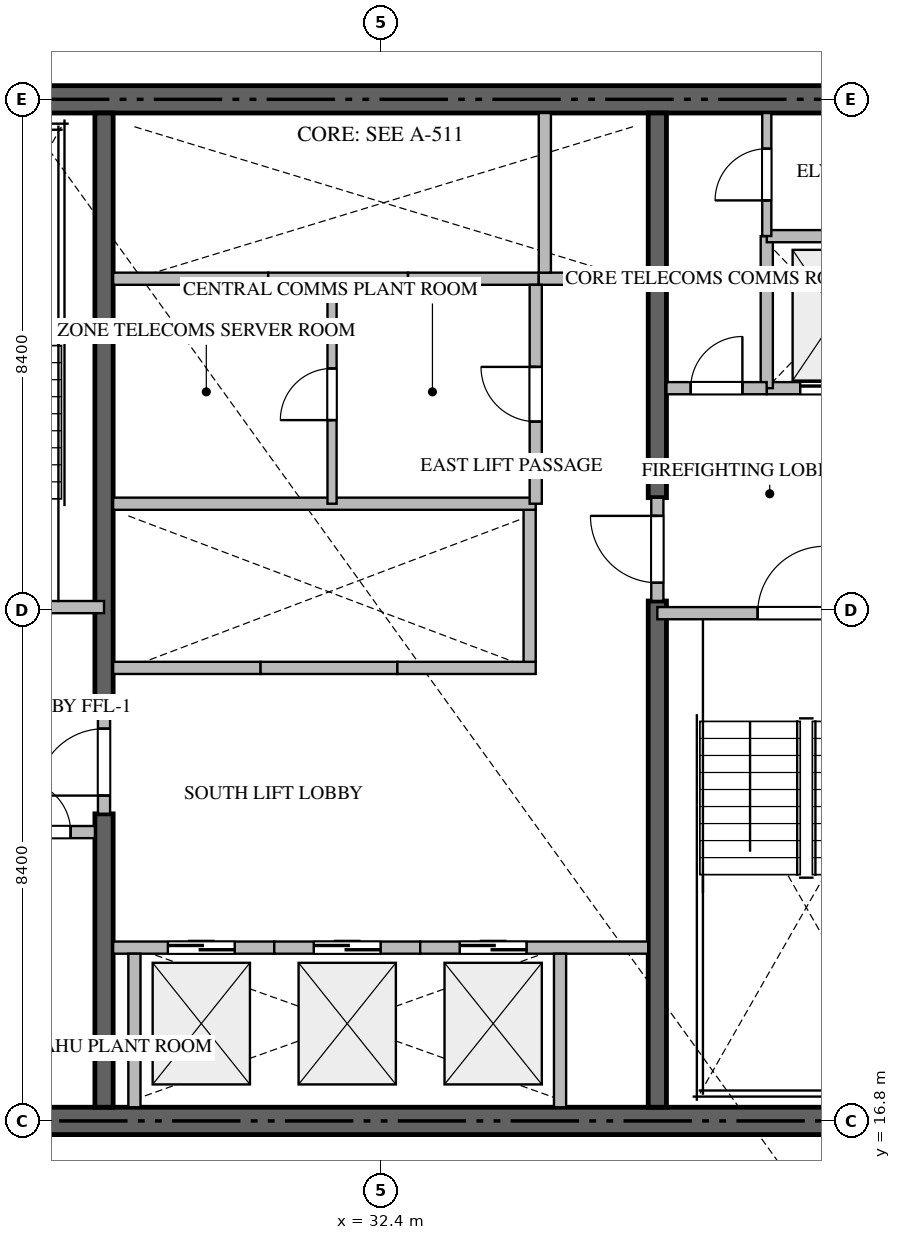
"""IFC4 building model, lengths in metres.
Left out: names, types, materials, properties, quantities, classifications, styles, units other than length and angle.
Written with IfcOpenShell. Run it as: python <this file> out.ifc"""

import sys

from ifc_helpers import new_model, si_unit, direction, frame, frame_2d, origin, place, context, subcontext, project, spatial, rectangle, extrude, source, transform, mapped, element, fill, save


model = new_model("IFC4")
c1 = context("Model", 3, precision=1e-05, world=origin(), true_north=direction((0.0, 1.0)))
c2 = subcontext(c1, "Body", "Model", "MODEL_VIEW")
j1 = project(units=[si_unit("LENGTHUNIT", "METRE"), si_unit("PLANEANGLEUNIT", "RADIAN")], contexts=[c1])
p1 = place(None, origin())
s1 = spatial("IfcSite", under=j1, at=p1, CompositionType="ELEMENT")
p2 = place(p1, origin())
s2 = spatial("IfcBuilding", under=s1, at=p2, CompositionType="ELEMENT")
p3 = place(p2, frame((0.0, 0.0, 34.2)))
s3 = spatial("IfcBuildingStorey", under=s2, at=p3, CompositionType="ELEMENT", Elevation=34.2)
for number, where, z_axis, x_axis in (
    (1, (23.4, 16.8, -0.26), (0.0, 0.0, 1.0), (1.0, 0.0, 0.0)),
    (2, (41.4, 33.6, -0.26), (0.0, 0.0, 1.0), (-1.0, 0.0, 0.0)),
):
    element("IfcWall", number, at=place(p3, frame(where, z_axis=z_axis, x_axis=x_axis)), inside=s3, PredefinedType="SHEAR", context=c2, shape_type="SweptSolid", body=[
        extrude(rectangle(XDim=18.0, YDim=0.45, at=frame_2d((9.0, 0.0))), origin(), (0.0, 0.0, 1.0), 3.748),
    ])
p4 = place(p3, frame((27.85, 17.025, -0.26), z_axis=(0.0, 0.0, 1.0), x_axis=(0.0, 1.0, 0.0)))
e3 = element("IfcWall", 3, at=p4, inside=s3, PredefinedType="SHEAR", context=c2, shape_type="SweptSolid", body=[
    extrude(rectangle(XDim=4.825, YDim=0.3, at=frame_2d((2.413, 0.0))), origin(), (0.0, 0.0, 1.0), 3.748),
])
p5 = place(p3, frame((27.85, 23.55, -0.26), z_axis=(0.0, 0.0, 1.0), x_axis=(0.0, 1.0, 0.0)))
e4 = element("IfcWall", 4, at=p5, inside=s3, PredefinedType="SHEAR", context=c2, shape_type="SweptSolid", body=[
    extrude(rectangle(XDim=9.825, YDim=0.3, at=frame_2d((4.913, 0.0))), origin(), (0.0, 0.0, 1.0), 3.748),
])
p6 = place(p3, frame((36.95, 17.025, -0.26), z_axis=(0.0, 0.0, 1.0), x_axis=(0.0, 1.0, 0.0)))
e5 = element("IfcWall", 5, at=p6, inside=s3, PredefinedType="SHEAR", context=c2, shape_type="SweptSolid", body=[
    extrude(rectangle(XDim=8.325, YDim=0.3, at=frame_2d((4.163, 0.0))), origin(), (0.0, 0.0, 1.0), 3.748),
])
p7 = place(p3, frame((36.95, 27.05, -0.26), z_axis=(0.0, 0.0, 1.0), x_axis=(0.0, 1.0, 0.0)))
e6 = element("IfcWall", 6, at=p7, inside=s3, PredefinedType="SHEAR", context=c2, shape_type="SweptSolid", body=[
    extrude(rectangle(XDim=6.325, YDim=0.3, at=frame_2d((3.163, 0.0))), origin(), (0.0, 0.0, 1.0), 3.748),
])
p8 = place(p3, frame((23.4, 25.25, 0.0), z_axis=(0.0, 0.0, 1.0), x_axis=(1.0, 0.0, 0.0)))
e7 = element("IfcWall", 7, at=p8, inside=s3, PredefinedType="STANDARD", context=c2, shape_type="SweptSolid", body=[
    extrude(rectangle(XDim=4.45, YDim=0.2, at=frame_2d((2.225, 0.0))), origin(), (0.0, 0.0, 1.0), 3.49),
])
p9 = place(p8, frame((1.65, 0.0, 0.0)))
e8 = element("IfcOpeningElement", 8, at=p9, cuts=e7, PredefinedType="OPENING", context=c2, shape_type="SweptSolid", body=[
    extrude(rectangle(XDim=1.1, YDim=2.15, at=frame_2d((0.55, 1.075))), frame((0.0, 0.11, 0.0), z_axis=(0.0, -1.0, 0.0), x_axis=(1.0, 0.0, 0.0)), (0.0, 0.0, 1.0), 0.22),
])
p10 = place(p3, frame((36.95, 25.15, 0.0), z_axis=(0.0, 0.0, 1.0), x_axis=(1.0, 0.0, 0.0)))
e9 = element("IfcWall", 9, at=p10, inside=s3, PredefinedType="STANDARD", context=c2, shape_type="SweptSolid", body=[
    extrude(rectangle(XDim=4.45, YDim=0.2, at=frame_2d((2.225, 0.0))), origin(), (0.0, 0.0, 1.0), 3.49),
])
p11 = place(p10, frame((1.65, 0.0, 0.0)))
e10 = element("IfcOpeningElement", 10, at=p11, cuts=e9, PredefinedType="OPENING", context=c2, shape_type="SweptSolid", body=[
    extrude(rectangle(XDim=1.1, YDim=2.15, at=frame_2d((0.55, 1.075))), frame((0.0, 0.11, 0.0), z_axis=(0.0, -1.0, 0.0), x_axis=(1.0, 0.0, 0.0)), (0.0, 0.0, 1.0), 0.22),
])
p12 = place(p3, frame((38.75, 28.85, 0.0), z_axis=(0.0, 0.0, 1.0), x_axis=(1.0, 0.0, 0.0)))
e11 = element("IfcWall", 11, at=p12, inside=s3, PredefinedType="STANDARD", context=c2, shape_type="SweptSolid", body=[
    extrude(rectangle(XDim=2.425, YDim=0.2, at=frame_2d((1.212, 0.0))), origin(), (0.0, 0.0, 1.0), 3.49),
])
p13 = place(p12, frame((0.55, 0.0, 0.0)))
e12 = element("IfcOpeningElement", 12, at=p13, cuts=e11, PredefinedType="OPENING", context=c2, shape_type="SweptSolid", body=[
    extrude(rectangle(XDim=1.2, YDim=2.2, at=frame_2d((0.6, 1.1))), frame((0.0, 0.11, 0.0), z_axis=(0.0, -1.0, 0.0), x_axis=(1.0, 0.0, 0.0)), (0.0, 0.0, 1.0), 0.22),
])
p14 = place(p3, frame((28.0, 19.65, 0.0), z_axis=(0.0, 0.0, 1.0), x_axis=(1.0, 0.0, 0.0)))
e13 = element("IfcWall", 13, at=p14, inside=s3, PredefinedType="STANDARD", context=c2, shape_type="SweptSolid", body=[
    extrude(rectangle(XDim=2.65, YDim=0.2, at=frame_2d((1.325, 0.0))), origin(), (0.0, 0.0, 1.0), 3.49),
])
p15 = place(p14, frame((0.9, 0.0, 0.0)))
e14 = element("IfcOpeningElement", 14, at=p15, cuts=e13, PredefinedType="OPENING", context=c2, shape_type="SweptSolid", body=[
    extrude(rectangle(XDim=1.1, YDim=2.2, at=frame_2d((0.55, 1.1))), frame((0.0, 0.11, 0.0), z_axis=(0.0, -1.0, 0.0), x_axis=(1.0, 0.0, 0.0)), (0.0, 0.0, 1.0), 0.22),
])
p16 = place(p3, frame((28.35, 17.025, 0.0), z_axis=(0.0, 0.0, 1.0), x_axis=(0.0, 1.0, 0.0)))
e15 = element("IfcWall", 15, at=p16, inside=s3, PredefinedType="STANDARD", context=c2, shape_type="SweptSolid", body=[
    extrude(rectangle(XDim=2.525, YDim=0.2, at=frame_2d((1.263, 0.0))), origin(), (0.0, 0.0, 1.0), 3.49),
])
p17 = place(p3, frame((30.65, 19.65, 0.0), z_axis=(0.0, 0.0, 1.0), x_axis=(1.0, 0.0, 0.0)))
e16 = element("IfcWall", 16, at=p17, inside=s3, PredefinedType="STANDARD", context=c2, shape_type="SweptSolid", body=[
    extrude(rectangle(XDim=2.4, YDim=0.2, at=frame_2d((1.2, 0.0))), origin(), (0.0, 0.0, 1.0), 3.49),
])
p18 = place(p17, frame((0.65, 0.0, 0.0)))
e17 = element("IfcOpeningElement", 17, at=p18, cuts=e16, PredefinedType="OPENING", context=c2, shape_type="SweptSolid", body=[
    extrude(rectangle(XDim=1.1, YDim=2.2, at=frame_2d((0.55, 1.1))), frame((0.0, 0.11, 0.0), z_axis=(0.0, -1.0, 0.0), x_axis=(1.0, 0.0, 0.0)), (0.0, 0.0, 1.0), 0.22),
])
p19 = place(p3, frame((33.05, 19.65, 0.0), z_axis=(0.0, 0.0, 1.0), x_axis=(1.0, 0.0, 0.0)))
e18 = element("IfcWall", 18, at=p19, inside=s3, PredefinedType="STANDARD", context=c2, shape_type="SweptSolid", body=[
    extrude(rectangle(XDim=3.75, YDim=0.2, at=frame_2d((1.875, 0.0))), origin(), (0.0, 0.0, 1.0), 3.49),
])
p20 = place(p19, frame((0.65, 0.0, 0.0)))
e19 = element("IfcOpeningElement", 19, at=p20, cuts=e18, PredefinedType="OPENING", context=c2, shape_type="SweptSolid", body=[
    extrude(rectangle(XDim=1.1, YDim=2.2, at=frame_2d((0.55, 1.1))), frame((0.0, 0.11, 0.0), z_axis=(0.0, -1.0, 0.0), x_axis=(1.0, 0.0, 0.0)), (0.0, 0.0, 1.0), 0.22),
])
p21 = place(p3, frame((35.35, 17.025, 0.0), z_axis=(0.0, 0.0, 1.0), x_axis=(0.0, 1.0, 0.0)))
e20 = element("IfcWall", 20, at=p21, inside=s3, PredefinedType="STANDARD", context=c2, shape_type="SweptSolid", body=[
    extrude(rectangle(XDim=2.525, YDim=0.2, at=frame_2d((1.263, 0.0))), origin(), (0.0, 0.0, 1.0), 3.49),
])
p22 = place(p3, frame((28.0, 24.25, 0.0), z_axis=(0.0, 0.0, 1.0), x_axis=(1.0, 0.0, 0.0)))
e21 = element("IfcWall", 21, at=p22, inside=s3, PredefinedType="STANDARD", context=c2, shape_type="SweptSolid", body=[
    extrude(rectangle(XDim=2.425, YDim=0.2, at=frame_2d((1.212, 0.0))), origin(), (0.0, 0.0, 1.0), 3.49),
])
p23 = place(p3, frame((30.425, 24.25, 0.0), z_axis=(0.0, 0.0, 1.0), x_axis=(1.0, 0.0, 0.0)))
e22 = element("IfcWall", 22, at=p23, inside=s3, PredefinedType="STANDARD", context=c2, shape_type="SweptSolid", body=[
    extrude(rectangle(XDim=2.25, YDim=0.2, at=frame_2d((1.125, 0.0))), origin(), (0.0, 0.0, 1.0), 3.49),
])
p24 = place(p3, frame((32.675, 24.25, 0.0), z_axis=(0.0, 0.0, 1.0), x_axis=(1.0, 0.0, 0.0)))
e23 = element("IfcWall", 23, at=p24, inside=s3, PredefinedType="STANDARD", context=c2, shape_type="SweptSolid", body=[
    extrude(rectangle(XDim=2.275, YDim=0.2, at=frame_2d((1.137, 0.0))), origin(), (0.0, 0.0, 1.0), 3.49),
])
p25 = place(p3, frame((34.85, 24.35, 0.0), z_axis=(0.0, 0.0, 1.0), x_axis=(0.0, 1.0, 0.0)))
e24 = element("IfcWall", 24, at=p25, inside=s3, PredefinedType="STANDARD", context=c2, shape_type="SweptSolid", body=[
    extrude(rectangle(XDim=2.5, YDim=0.2, at=frame_2d((1.25, 0.0))), origin(), (0.0, 0.0, 1.0), 3.49),
])
p26 = place(p3, frame((28.0, 30.65, 0.0), z_axis=(0.0, 0.0, 1.0), x_axis=(1.0, 0.0, 0.0)))
e25 = element("IfcWall", 25, at=p26, inside=s3, PredefinedType="STANDARD", context=c2, shape_type="SweptSolid", body=[
    extrude(rectangle(XDim=2.55, YDim=0.2, at=frame_2d((1.275, 0.0))), origin(), (0.0, 0.0, 1.0), 3.49),
])
p27 = place(p3, frame((30.55, 30.65, 0.0), z_axis=(0.0, 0.0, 1.0), x_axis=(1.0, 0.0, 0.0)))
e26 = element("IfcWall", 26, at=p27, inside=s3, PredefinedType="STANDARD", context=c2, shape_type="SweptSolid", body=[
    extrude(rectangle(XDim=2.3, YDim=0.2, at=frame_2d((1.15, 0.0))), origin(), (0.0, 0.0, 1.0), 3.49),
])
p28 = place(p3, frame((32.85, 30.65, 0.0), z_axis=(0.0, 0.0, 1.0), x_axis=(1.0, 0.0, 0.0)))
e27 = element("IfcWall", 27, at=p28, inside=s3, PredefinedType="STANDARD", context=c2, shape_type="SweptSolid", body=[
    extrude(rectangle(XDim=2.15, YDim=0.2, at=frame_2d((1.075, 0.0))), origin(), (0.0, 0.0, 1.0), 3.49),
])
p29 = place(p3, frame((35.0, 30.65, 0.0), z_axis=(0.0, 0.0, 1.0), x_axis=(1.0, 0.0, 0.0)))
e28 = element("IfcWall", 28, at=p29, inside=s3, PredefinedType="STANDARD", context=c2, shape_type="SweptSolid", body=[
    extrude(rectangle(XDim=1.8, YDim=0.2, at=frame_2d((0.9, 0.0))), origin(), (0.0, 0.0, 1.0), 3.49),
])
p30 = place(p3, frame((35.1, 30.75, 0.0), z_axis=(0.0, 0.0, 1.0), x_axis=(0.0, 1.0, 0.0)))
e29 = element("IfcWall", 29, at=p30, inside=s3, PredefinedType="STANDARD", context=c2, shape_type="SweptSolid", body=[
    extrude(rectangle(XDim=2.625, YDim=0.2, at=frame_2d((1.312, 0.0))), origin(), (0.0, 0.0, 1.0), 3.49),
])
p31 = place(p3, frame((26.052, 21.55, 0.0), z_axis=(0.0, 0.0, 1.0), x_axis=(1.0, 0.0, 0.0)))
e30 = element("IfcWall", 30, at=p31, inside=s3, PredefinedType="STANDARD", context=c2, shape_type="SweptSolid", body=[
    extrude(rectangle(XDim=1.648, YDim=0.2, at=frame_2d((0.824, 0.0))), origin(), (0.0, 0.0, 1.0), 3.49),
])
p32 = place(p31, frame((0.399, 0.0, 0.0)))
e31 = element("IfcOpeningElement", 31, at=p32, cuts=e30, PredefinedType="OPENING", context=c2, shape_type="SweptSolid", body=[
    extrude(rectangle(XDim=0.85, YDim=2.1, at=frame_2d((0.425, 1.05))), frame((0.0, 0.11, 0.0), z_axis=(0.0, -1.0, 0.0), x_axis=(1.0, 0.0, 0.0)), (0.0, 0.0, 1.0), 0.22),
])
p33 = place(p3, frame((38.75, 28.85, 0.0), z_axis=(0.0, 0.0, 1.0), x_axis=(0.0, 1.0, 0.0)))
e32 = element("IfcWall", 32, at=p33, inside=s3, PredefinedType="STANDARD", context=c2, shape_type="SweptSolid", body=[
    extrude(rectangle(XDim=2.5, YDim=0.2, at=frame_2d((1.25, 0.0))), origin(), (0.0, 0.0, 1.0), 3.49),
])
p34 = place(p3, frame((38.75, 31.35, 0.0), z_axis=(0.0, 0.0, 1.0), x_axis=(1.0, 0.0, 0.0)))
e33 = element("IfcWall", 33, at=p34, inside=s3, PredefinedType="STANDARD", context=c2, shape_type="SweptSolid", body=[
    extrude(rectangle(XDim=2.425, YDim=0.2, at=frame_2d((1.212, 0.0))), origin(), (0.0, 0.0, 1.0), 3.49),
])
p35 = place(p3, frame((37.1, 28.85, 0.0), z_axis=(0.0, 0.0, 1.0), x_axis=(1.0, 0.0, 0.0)))
e34 = element("IfcWall", 34, at=p35, inside=s3, PredefinedType="STANDARD", context=c2, shape_type="SweptSolid", body=[
    extrude(rectangle(XDim=1.648, YDim=0.2, at=frame_2d((0.824, 0.0))), origin(), (0.0, 0.0, 1.0), 3.49),
])
p36 = place(p35, frame((0.399, 0.0, 0.0)))
e35 = element("IfcOpeningElement", 35, at=p36, cuts=e34, PredefinedType="OPENING", context=c2, shape_type="SweptSolid", body=[
    extrude(rectangle(XDim=0.85, YDim=2.1, at=frame_2d((0.425, 1.05))), frame((0.0, 0.11, 0.0), z_axis=(0.0, -1.0, 0.0), x_axis=(1.0, 0.0, 0.0)), (0.0, 0.0, 1.0), 0.22),
])
p37 = place(p3, frame((27.85, 21.852, 0.0), z_axis=(0.0, 0.0, 1.0), x_axis=(0.0, 1.0, 0.0)))
e36 = element("IfcWall", 36, at=p37, inside=s3, PredefinedType="STANDARD", context=c2, shape_type="SweptSolid", body=[
    extrude(rectangle(XDim=1.696, YDim=0.2, at=frame_2d((0.848, 0.0))), origin(), (0.0, 0.0, 1.0), 3.49),
])
p38 = place(p37, frame((0.298, 0.0, 0.0)))
e37 = element("IfcOpeningElement", 37, at=p38, cuts=e36, PredefinedType="OPENING", context=c2, shape_type="SweptSolid", body=[
    extrude(rectangle(XDim=1.1, YDim=2.15, at=frame_2d((0.55, 1.075))), frame((0.0, 0.11, 0.0), z_axis=(0.0, -1.0, 0.0), x_axis=(1.0, 0.0, 0.0)), (0.0, 0.0, 1.0), 0.22),
])
p39 = place(p3, frame((36.95, 25.352, 0.0), z_axis=(0.0, 0.0, 1.0), x_axis=(0.0, 1.0, 0.0)))
e38 = element("IfcWall", 38, at=p39, inside=s3, PredefinedType="STANDARD", context=c2, shape_type="SweptSolid", body=[
    extrude(rectangle(XDim=1.696, YDim=0.2, at=frame_2d((0.848, 0.0))), origin(), (0.0, 0.0, 1.0), 3.49),
])
p40 = place(p39, frame((0.298, 0.0, 0.0)))
e39 = element("IfcOpeningElement", 39, at=p40, cuts=e38, PredefinedType="OPENING", context=c2, shape_type="SweptSolid", body=[
    extrude(rectangle(XDim=1.1, YDim=2.15, at=frame_2d((0.55, 1.075))), frame((0.0, 0.11, 0.0), z_axis=(0.0, -1.0, 0.0), x_axis=(1.0, 0.0, 0.0)), (0.0, 0.0, 1.0), 0.22),
])
p41 = place(p3, frame((28.0, 26.95, 0.0), z_axis=(0.0, 0.0, 1.0), x_axis=(1.0, 0.0, 0.0)))
e40 = element("IfcWall", 40, at=p41, inside=s3, PredefinedType="STANDARD", context=c2, shape_type="SweptSolid", body=[
    extrude(rectangle(XDim=6.95, YDim=0.2, at=frame_2d((3.475, 0.0))), origin(), (0.0, 0.0, 1.0), 3.49),
])
p42 = place(p3, frame((38.75, 31.352, 0.0), z_axis=(0.0, 0.0, 1.0), x_axis=(0.0, 1.0, 0.0)))
e41 = element("IfcWall", 41, at=p42, inside=s3, PredefinedType="PARTITIONING", context=c2, shape_type="SweptSolid", body=[
    extrude(rectangle(XDim=2.023, YDim=0.15, at=frame_2d((1.011, 0.0))), origin(), (0.0, 0.0, 1.0), 3.49),
])
p43 = place(p42, frame((0.586, 0.0, 0.0)))
e42 = element("IfcOpeningElement", 42, at=p43, cuts=e41, PredefinedType="OPENING", context=c2, shape_type="SweptSolid", body=[
    extrude(rectangle(XDim=0.85, YDim=2.1, at=frame_2d((0.425, 1.05))), frame((0.0, 0.085, 0.0), z_axis=(0.0, -1.0, 0.0), x_axis=(1.0, 0.0, 0.0)), (0.0, 0.0, 1.0), 0.17),
])
p44 = place(p3, frame((34.95, 26.95, 0.0), z_axis=(0.0, 0.0, 1.0), x_axis=(0.0, 1.0, 0.0)))
e43 = element("IfcWall", 43, at=p44, inside=s3, PredefinedType="STANDARD", context=c2, shape_type="SweptSolid", body=[
    extrude(rectangle(XDim=3.6, YDim=0.2, at=frame_2d((1.8, 0.0))), origin(), (0.0, 0.0, 1.0), 3.49),
])
p45 = place(p44, frame((1.35, 0.0, 0.0)))
e44 = element("IfcOpeningElement", 44, at=p45, cuts=e43, PredefinedType="OPENING", context=c2, shape_type="SweptSolid", body=[
    extrude(rectangle(XDim=0.9, YDim=2.1, at=frame_2d((0.45, 1.05))), frame((0.0, 0.11, 0.0), z_axis=(0.0, -1.0, 0.0), x_axis=(1.0, 0.0, 0.0)), (0.0, 0.0, 1.0), 0.22),
])
p46 = place(p3, frame((31.6, 26.95, 0.0), z_axis=(0.0, 0.0, 1.0), x_axis=(0.0, 1.0, 0.0)))
e45 = element("IfcWall", 45, at=p46, inside=s3, PredefinedType="PARTITIONING", context=c2, shape_type="SweptSolid", body=[
    extrude(rectangle(XDim=3.6, YDim=0.15, at=frame_2d((1.8, 0.0))), origin(), (0.0, 0.0, 1.0), 3.49),
])
p47 = place(p46, frame((1.375, 0.0, 0.0)))
e46 = element("IfcOpeningElement", 46, at=p47, cuts=e45, PredefinedType="OPENING", context=c2, shape_type="SweptSolid", body=[
    extrude(rectangle(XDim=0.85, YDim=2.1, at=frame_2d((0.425, 1.05))), frame((0.0, 0.085, 0.0), z_axis=(0.0, -1.0, 0.0), x_axis=(1.0, 0.0, 0.0)), (0.0, 0.0, 1.0), 0.17),
])
m1 = source(origin(), c2, "Body", "SweptSolid", [
    extrude(rectangle(XDim=1.1, YDim=2.15, at=frame_2d((0.55, 1.075))), frame((0.0, 0.025, 0.0), z_axis=(0.0, -1.0, 0.0), x_axis=(1.0, 0.0, 0.0)), (0.0, 0.0, 1.0), 0.05),
])
p48 = place(p11, origin())
e47 = element("IfcDoor", 47, at=p48, inside=s3, OperationType="SINGLE_SWING_RIGHT", PredefinedType="DOOR", context=c2, shape_type="MappedRepresentation", body=[
    mapped(m1, transform((0.0, 0.0, 0.0), scale=1.0)),
])
fill(e10, e47)
m2 = source(origin(), c2, "Body", "SweptSolid", [
    extrude(rectangle(XDim=1.2, YDim=2.2, at=frame_2d((0.6, 1.1))), frame((0.0, 0.025, 0.0), z_axis=(0.0, -1.0, 0.0), x_axis=(1.0, 0.0, 0.0)), (0.0, 0.0, 1.0), 0.05),
])
p49 = place(p13, origin())
e48 = element("IfcDoor", 48, at=p49, inside=s3, OperationType="DOUBLE_DOOR_SLIDING", PredefinedType="DOOR", context=c2, shape_type="MappedRepresentation", body=[
    mapped(m2, transform((0.0, 0.0, 0.0), scale=1.0)),
])
fill(e12, e48)
m3 = source(origin(), c2, "Body", "SweptSolid", [
    extrude(rectangle(XDim=1.1, YDim=2.2, at=frame_2d((0.55, 1.1))), frame((0.0, 0.025, 0.0), z_axis=(0.0, -1.0, 0.0), x_axis=(1.0, 0.0, 0.0)), (0.0, 0.0, 1.0), 0.05),
])
p50 = place(p15, origin())
e49 = element("IfcDoor", 49, at=p50, inside=s3, OperationType="DOUBLE_DOOR_SLIDING", PredefinedType="DOOR", context=c2, shape_type="MappedRepresentation", body=[
    mapped(m3, transform((0.0, 0.0, 0.0), scale=1.0)),
])
fill(e14, e49)
p51 = place(p18, origin())
e50 = element("IfcDoor", 50, at=p51, inside=s3, OperationType="DOUBLE_DOOR_SLIDING", PredefinedType="DOOR", context=c2, shape_type="MappedRepresentation", body=[
    mapped(m3, transform((0.0, 0.0, 0.0), scale=1.0)),
])
fill(e17, e50)
p52 = place(p20, origin())
e51 = element("IfcDoor", 51, at=p52, inside=s3, OperationType="DOUBLE_DOOR_SLIDING", PredefinedType="DOOR", context=c2, shape_type="MappedRepresentation", body=[
    mapped(m3, transform((0.0, 0.0, 0.0), scale=1.0)),
])
fill(e19, e51)
m4 = source(origin(), c2, "Body", "SweptSolid", [
    extrude(rectangle(XDim=0.85, YDim=2.1, at=frame_2d((0.425, 1.05))), frame((0.0, 0.025, 0.0), z_axis=(0.0, -1.0, 0.0), x_axis=(1.0, 0.0, 0.0)), (0.0, 0.0, 1.0), 0.05),
])
p53 = place(p32, origin())
e52 = element("IfcDoor", 52, at=p53, inside=s3, OperationType="SINGLE_SWING_LEFT", PredefinedType="DOOR", context=c2, shape_type="MappedRepresentation", body=[
    mapped(m4, transform((0.0, 0.0, 0.0), scale=1.0)),
])
fill(e31, e52)
p54 = place(p36, origin())
e53 = element("IfcDoor", 53, at=p54, inside=s3, OperationType="SINGLE_SWING_RIGHT", PredefinedType="DOOR", context=c2, shape_type="MappedRepresentation", body=[
    mapped(m4, transform((0.0, 0.0, 0.0), scale=1.0)),
])
fill(e35, e53)
p55 = place(p38, origin())
e54 = element("IfcDoor", 54, at=p55, inside=s3, OperationType="SINGLE_SWING_LEFT", PredefinedType="DOOR", context=c2, shape_type="MappedRepresentation", body=[
    mapped(m1, transform((0.0, 0.0, 0.0), scale=1.0)),
])
fill(e37, e54)
p56 = place(p40, origin())
e55 = element("IfcDoor", 55, at=p56, inside=s3, OperationType="SINGLE_SWING_RIGHT", PredefinedType="DOOR", context=c2, shape_type="MappedRepresentation", body=[
    mapped(m1, transform((0.0, 0.0, 0.0), scale=1.0)),
])
fill(e39, e55)
p57 = place(p43, origin())
e56 = element("IfcDoor", 56, at=p57, inside=s3, OperationType="SINGLE_SWING_LEFT", PredefinedType="DOOR", context=c2, shape_type="MappedRepresentation", body=[
    mapped(m4, transform((0.0, 0.0, 0.0), scale=1.0)),
])
fill(e42, e56)
m5 = source(origin(), c2, "Body", "SweptSolid", [
    extrude(rectangle(XDim=0.9, YDim=2.1, at=frame_2d((0.45, 1.05))), frame((0.0, 0.025, 0.0), z_axis=(0.0, -1.0, 0.0), x_axis=(1.0, 0.0, 0.0)), (0.0, 0.0, 1.0), 0.05),
])
p58 = place(p45, origin())
e57 = element("IfcDoor", 57, at=p58, inside=s3, OperationType="SINGLE_SWING_RIGHT", PredefinedType="DOOR", context=c2, shape_type="MappedRepresentation", body=[
    mapped(m5, transform((0.0, 0.0, 0.0), scale=1.0)),
])
fill(e44, e57)
p59 = place(p47, origin())
e58 = element("IfcDoor", 58, at=p59, inside=s3, OperationType="SINGLE_SWING_LEFT", PredefinedType="DOOR", context=c2, shape_type="MappedRepresentation", body=[
    mapped(m4, transform((0.0, 0.0, 0.0), scale=1.0)),
])
fill(e46, e58)
save(model, sys.argv[1])
